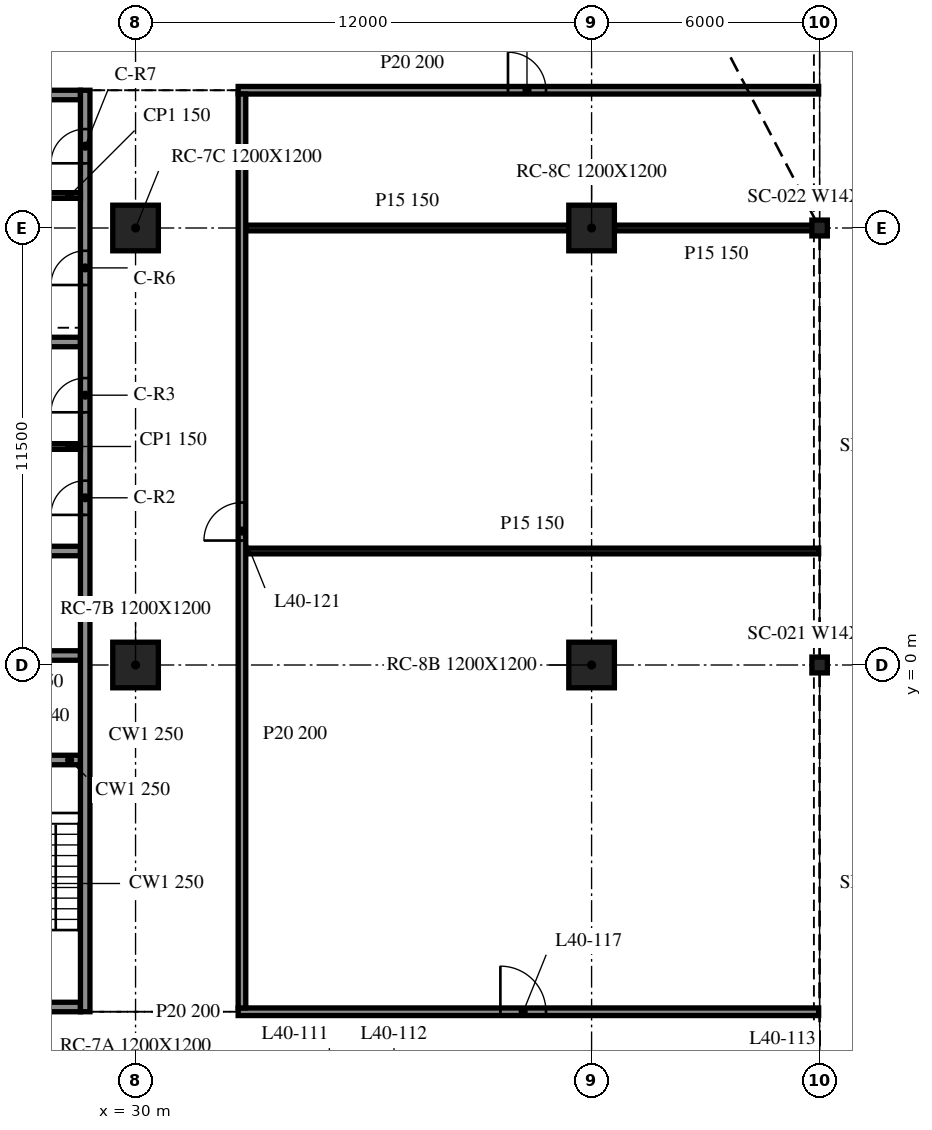
"""IFC4 building model, lengths in metres.
Left out: names, types, materials, properties, quantities, classifications, styles, units other than length and angle.
Written with IfcOpenShell. Run it as: python <this file> out.ifc"""

import sys

from ifc_helpers import new_model, si_unit, direction, frame, frame_2d, origin, origin_2d, place, context, subcontext, project, spatial, rectangle, i_section, extrude, element, fill, save


model = new_model("IFC4")
c1 = context("Model", 3, precision=1e-05, world=origin(), true_north=direction((0.0, 1.0)))
c2 = subcontext(c1, "Body", "Model", "MODEL_VIEW")
j1 = project(units=[si_unit("LENGTHUNIT", "METRE"), si_unit("PLANEANGLEUNIT", "RADIAN")], contexts=[c1])
p1 = place(None, origin())
s1 = spatial("IfcSite", under=j1, at=p1, CompositionType="ELEMENT")
p2 = place(p1, origin())
s2 = spatial("IfcBuilding", under=s1, at=p2, CompositionType="ELEMENT")
p3 = place(p2, frame((0.0, 0.0, 170.6)))
s3 = spatial("IfcBuildingStorey", under=s2, at=p3, CompositionType="ELEMENT", Elevation=170.6)
for number, where, z_axis, x_axis in (
    (1, (30.0, 0.0, -0.34), (0.0, 0.0, 1.0), (1.0, 0.0, 0.0)),
    (2, (30.0, 11.5, -0.34), (0.0, 0.0, 1.0), (1.0, 0.0, 0.0)),
    (3, (42.0, 0.0, -0.34), (0.0, 0.0, 1.0), (1.0, 0.0, 0.0)),
    (4, (42.0, 11.5, -0.34), (0.0, 0.0, 1.0), (1.0, 0.0, 0.0)),
):
    element("IfcColumn", number, at=place(p3, frame(where, z_axis=z_axis, x_axis=x_axis)), inside=s3, PredefinedType="COLUMN", context=c2, shape_type="SweptSolid", body=[
        extrude(rectangle(XDim=1.2, YDim=1.2, at=origin_2d()), origin(), (0.0, 0.0, 1.0), 3.8),
    ])
for number, where, z_axis, x_axis in (
    (5, (48.0, 0.0, -0.34), (0.0, 0.0, 1.0), (1.0, 0.0, 0.0)),
    (6, (48.0, 11.5, -0.34), (0.0, 0.0, 1.0), (1.0, 0.0, 0.0)),
):
    element("IfcColumn", number, at=place(p3, frame(where, z_axis=z_axis, x_axis=x_axis)), inside=s3, PredefinedType="COLUMN", context=c2, shape_type="SweptSolid", body=[
        extrude(i_section(OverallWidth=0.406, OverallDepth=0.417, WebThickness=0.03, FlangeThickness=0.048, at=origin_2d()), origin(), (0.0, 0.0, 1.0), 3.8),
    ])
p4 = place(p3, frame((28.675, -9.125, 0.0), z_axis=(0.0, 0.0, 1.0), x_axis=(0.0, 1.0, 0.0)))
e7 = element("IfcWall", 7, at=p4, inside=s3, PredefinedType="SOLIDWALL", context=c2, shape_type="SweptSolid", body=[
    extrude(rectangle(XDim=24.25, YDim=0.25, at=frame_2d((12.125, 0.0))), origin(), (0.0, 0.0, 1.0), 3.46),
])
p5 = place(p4, frame((13.075, 0.0, 0.0)))
e8 = element("IfcOpeningElement", 8, at=p5, cuts=e7, PredefinedType="OPENING", context=c2, shape_type="SweptSolid", body=[
    extrude(rectangle(XDim=0.9, YDim=2.1, at=frame_2d((0.45, 1.05))), frame((0.0, 0.135, 0.0), z_axis=(0.0, -1.0, 0.0), x_axis=(1.0, 0.0, 0.0)), (0.0, 0.0, 1.0), 0.27),
])
p6 = place(p4, frame((15.775, 0.0, 0.0)))
e9 = element("IfcOpeningElement", 9, at=p6, cuts=e7, PredefinedType="OPENING", context=c2, shape_type="SweptSolid", body=[
    extrude(rectangle(XDim=0.9, YDim=2.1, at=frame_2d((0.45, 1.05))), frame((0.0, 0.135, 0.0), z_axis=(0.0, -1.0, 0.0), x_axis=(1.0, 0.0, 0.0)), (0.0, 0.0, 1.0), 0.27),
])
p7 = place(p4, frame((19.125, 0.0, 0.0)))
e10 = element("IfcOpeningElement", 10, at=p7, cuts=e7, PredefinedType="OPENING", context=c2, shape_type="SweptSolid", body=[
    extrude(rectangle(XDim=0.9, YDim=2.1, at=frame_2d((0.45, 1.05))), frame((0.0, 0.135, 0.0), z_axis=(0.0, -1.0, 0.0), x_axis=(1.0, 0.0, 0.0)), (0.0, 0.0, 1.0), 0.27),
])
p8 = place(p4, frame((22.327, 0.0, 0.0)))
e11 = element("IfcOpeningElement", 11, at=p8, cuts=e7, PredefinedType="OPENING", context=c2, shape_type="SweptSolid", body=[
    extrude(rectangle(XDim=0.9, YDim=2.1, at=frame_2d((0.45, 1.05))), frame((0.0, 0.135, 0.0), z_axis=(0.0, -1.0, 0.0), x_axis=(1.0, 0.0, 0.0)), (0.0, 0.0, 1.0), 0.27),
])
p9 = place(p3, frame((28.55, -9.0, 0.0), z_axis=(0.0, 0.0, 1.0), x_axis=(-1.0, 0.0, 0.0)))
e12 = element("IfcWall", 12, at=p9, inside=s3, PredefinedType="SOLIDWALL", context=c2, shape_type="SweptSolid", body=[
    extrude(rectangle(XDim=9.1, YDim=0.25, at=frame_2d((4.55, 0.0))), origin(), (0.0, 0.0, 1.0), 3.46),
])
p10 = place(p9, frame((3.65, 0.0, 0.0)))
e13 = element("IfcOpeningElement", 13, at=p10, cuts=e12, PredefinedType="OPENING", context=c2, shape_type="SweptSolid", body=[
    extrude(rectangle(XDim=1.8, YDim=2.1, at=frame_2d((0.9, 1.05))), frame((0.0, 0.135, 0.0), z_axis=(0.0, -1.0, 0.0), x_axis=(1.0, 0.0, 0.0)), (0.0, 0.0, 1.0), 0.27),
])
p11 = place(p3, frame((19.45, 15.0, 0.0), z_axis=(0.0, 0.0, 1.0), x_axis=(1.0, 0.0, 0.0)))
e14 = element("IfcWall", 14, at=p11, inside=s3, PredefinedType="SOLIDWALL", context=c2, shape_type="SweptSolid", body=[
    extrude(rectangle(XDim=9.1, YDim=0.25, at=frame_2d((4.55, 0.0))), origin(), (0.0, 0.0, 1.0), 3.46),
])
p12 = place(p11, frame((3.65, 0.0, 0.0)))
e15 = element("IfcOpeningElement", 15, at=p12, cuts=e14, PredefinedType="OPENING", context=c2, shape_type="SweptSolid", body=[
    extrude(rectangle(XDim=1.8, YDim=2.1, at=frame_2d((0.9, 1.05))), frame((0.0, 0.135, 0.0), z_axis=(0.0, -1.0, 0.0), x_axis=(1.0, 0.0, 0.0)), (0.0, 0.0, 1.0), 0.27),
])
for number, where, z_axis, x_axis in (
    (16, (25.7, -2.5, 0.0), (0.0, 0.0, 1.0), (1.0, 0.0, 0.0)),
    (17, (25.7, 0.25, 0.0), (0.0, 0.0, 1.0), (1.0, 0.0, 0.0)),
    (18, (25.7, 3.0, 0.0), (0.0, 0.0, 1.0), (1.0, 0.0, 0.0)),
    (19, (25.7, 8.5, 0.0), (0.0, 0.0, 1.0), (1.0, 0.0, 0.0)),
):
    element("IfcWall", number, at=place(p3, frame(where, z_axis=z_axis, x_axis=x_axis)), inside=s3, PredefinedType="SOLIDWALL", context=c2, shape_type="SweptSolid", body=[
        extrude(rectangle(XDim=2.85, YDim=0.25, at=frame_2d((1.425, 0.0))), origin(), (0.0, 0.0, 1.0), 3.46),
    ])
for number, where, z_axis, x_axis in (
    (20, (25.7, 5.75, 0.0), (0.0, 0.0, 1.0), (1.0, 0.0, 0.0)),
    (21, (25.7, 12.355, 0.0), (0.0, 0.0, 1.0), (1.0, 0.0, 0.0)),
):
    element("IfcWall", number, at=place(p3, frame(where, z_axis=z_axis, x_axis=x_axis)), inside=s3, PredefinedType="PARTITIONING", context=c2, shape_type="SweptSolid", body=[
        extrude(rectangle(XDim=2.85, YDim=0.15, at=frame_2d((1.425, 0.0))), origin(), (0.0, 0.0, 1.0), 3.46),
    ])
p13 = place(p3, frame((32.7, -9.125, 0.0), z_axis=(0.0, 0.0, 1.0), x_axis=(1.0, 0.0, 0.0)))
e22 = element("IfcWall", 22, at=p13, inside=s3, PredefinedType="PARTITIONING", context=c2, shape_type="SweptSolid", body=[
    extrude(rectangle(XDim=15.275, YDim=0.2, at=frame_2d((7.638, 0.0))), origin(), (0.0, 0.0, 1.0), 3.46),
])
p14 = place(p13, frame((6.9, 0.0, 0.0)))
e23 = element("IfcOpeningElement", 23, at=p14, cuts=e22, PredefinedType="OPENING", context=c2, shape_type="SweptSolid", body=[
    extrude(rectangle(XDim=1.2, YDim=2.1, at=frame_2d((0.6, 1.05))), frame((0.0, 0.11, 0.0), z_axis=(0.0, -1.0, 0.0), x_axis=(1.0, 0.0, 0.0)), (0.0, 0.0, 1.0), 0.22),
])
p15 = place(p3, frame((32.9, 3.0, 0.0), z_axis=(0.0, 0.0, 1.0), x_axis=(1.0, 0.0, 0.0)))
e24 = element("IfcWall", 24, at=p15, inside=s3, PredefinedType="PARTITIONING", context=c2, shape_type="SweptSolid", body=[
    extrude(rectangle(XDim=15.075, YDim=0.15, at=frame_2d((7.538, 0.0))), origin(), (0.0, 0.0, 1.0), 3.46),
])
p16 = place(p3, frame((32.9, 11.5, 0.0), z_axis=(0.0, 0.0, 1.0), x_axis=(1.0, 0.0, 0.0)))
e25 = element("IfcWall", 25, at=p16, inside=s3, PredefinedType="PARTITIONING", context=c2, shape_type="SweptSolid", body=[
    extrude(rectangle(XDim=8.5, YDim=0.15, at=frame_2d((4.25, 0.0))), origin(), (0.0, 0.0, 1.0), 3.46),
])
p17 = place(p3, frame((42.6, 11.5, 0.0), z_axis=(0.0, 0.0, 1.0), x_axis=(1.0, 0.0, 0.0)))
e26 = element("IfcWall", 26, at=p17, inside=s3, PredefinedType="PARTITIONING", context=c2, shape_type="SweptSolid", body=[
    extrude(rectangle(XDim=5.375, YDim=0.15, at=frame_2d((2.688, 0.0))), origin(), (0.0, 0.0, 1.0), 3.46),
])
p18 = place(p3, frame((32.7, 15.125, 0.0), z_axis=(0.0, 0.0, 1.0), x_axis=(1.0, 0.0, 0.0)))
e27 = element("IfcWall", 27, at=p18, inside=s3, PredefinedType="PARTITIONING", context=c2, shape_type="SweptSolid", body=[
    extrude(rectangle(XDim=15.275, YDim=0.2, at=frame_2d((7.638, 0.0))), origin(), (0.0, 0.0, 1.0), 3.46),
])
p19 = place(p18, frame((7.1, 0.0, 0.0)))
e28 = element("IfcOpeningElement", 28, at=p19, cuts=e27, PredefinedType="OPENING", context=c2, shape_type="SweptSolid", body=[
    extrude(rectangle(XDim=1.0, YDim=2.1, at=frame_2d((0.5, 1.05))), frame((0.0, 0.11, 0.0), z_axis=(0.0, -1.0, 0.0), x_axis=(1.0, 0.0, 0.0)), (0.0, 0.0, 1.0), 0.22),
])
p20 = place(p3, frame((32.8, -9.025, 0.0), z_axis=(0.0, 0.0, 1.0), x_axis=(0.0, 1.0, 0.0)))
e29 = element("IfcWall", 29, at=p20, inside=s3, PredefinedType="PARTITIONING", context=c2, shape_type="SweptSolid", body=[
    extrude(rectangle(XDim=24.05, YDim=0.2, at=frame_2d((12.025, 0.0))), origin(), (0.0, 0.0, 1.0), 3.46),
])
p21 = place(p20, frame((12.3, 0.0, 0.0)))
e30 = element("IfcOpeningElement", 30, at=p21, cuts=e29, PredefinedType="OPENING", context=c2, shape_type="SweptSolid", body=[
    extrude(rectangle(XDim=1.0, YDim=2.1, at=frame_2d((0.5, 1.05))), frame((0.0, 0.11, 0.0), z_axis=(0.0, -1.0, 0.0), x_axis=(1.0, 0.0, 0.0)), (0.0, 0.0, 1.0), 0.22),
])
p22 = place(p5, origin())
e31 = element("IfcDoor", 31, at=p22, inside=s3, OperationType="SINGLE_SWING_RIGHT", PredefinedType="DOOR", context=c2, shape_type="SweptSolid", body=[
    extrude(rectangle(XDim=0.9, YDim=2.1, at=frame_2d((0.45, 1.05))), frame((0.0, 0.025, 0.0), z_axis=(0.0, -1.0, 0.0), x_axis=(1.0, 0.0, 0.0)), (0.0, 0.0, 1.0), 0.05),
])
fill(e8, e31)
p23 = place(p6, origin())
e32 = element("IfcDoor", 32, at=p23, inside=s3, OperationType="SINGLE_SWING_LEFT", PredefinedType="DOOR", context=c2, shape_type="SweptSolid", body=[
    extrude(rectangle(XDim=0.9, YDim=2.1, at=frame_2d((0.45, 1.05))), frame((0.0, 0.025, 0.0), z_axis=(0.0, -1.0, 0.0), x_axis=(1.0, 0.0, 0.0)), (0.0, 0.0, 1.0), 0.05),
])
fill(e9, e32)
p24 = place(p7, origin())
e33 = element("IfcDoor", 33, at=p24, inside=s3, OperationType="SINGLE_SWING_RIGHT", PredefinedType="DOOR", context=c2, shape_type="SweptSolid", body=[
    extrude(rectangle(XDim=0.9, YDim=2.1, at=frame_2d((0.45, 1.05))), frame((0.0, 0.025, 0.0), z_axis=(0.0, -1.0, 0.0), x_axis=(1.0, 0.0, 0.0)), (0.0, 0.0, 1.0), 0.05),
])
fill(e10, e33)
p25 = place(p8, origin())
e34 = element("IfcDoor", 34, at=p25, inside=s3, OperationType="SINGLE_SWING_LEFT", PredefinedType="DOOR", context=c2, shape_type="SweptSolid", body=[
    extrude(rectangle(XDim=0.9, YDim=2.1, at=frame_2d((0.45, 1.05))), frame((0.0, 0.025, 0.0), z_axis=(0.0, -1.0, 0.0), x_axis=(1.0, 0.0, 0.0)), (0.0, 0.0, 1.0), 0.05),
])
fill(e11, e34)
p26 = place(p14, origin())
e35 = element("IfcDoor", 35, at=p26, inside=s3, OperationType="SINGLE_SWING_LEFT", PredefinedType="DOOR", context=c2, shape_type="SweptSolid", body=[
    extrude(rectangle(XDim=1.2, YDim=2.1, at=frame_2d((0.6, 1.05))), frame((0.0, 0.025, 0.0), z_axis=(0.0, -1.0, 0.0), x_axis=(1.0, 0.0, 0.0)), (0.0, 0.0, 1.0), 0.05),
])
fill(e23, e35)
p27 = place(p21, origin())
e36 = element("IfcDoor", 36, at=p27, inside=s3, OperationType="SINGLE_SWING_LEFT", PredefinedType="DOOR", context=c2, shape_type="SweptSolid", body=[
    extrude(rectangle(XDim=1.0, YDim=2.1, at=frame_2d((0.5, 1.05))), frame((0.0, 0.025, 0.0), z_axis=(0.0, -1.0, 0.0), x_axis=(1.0, 0.0, 0.0)), (0.0, 0.0, 1.0), 0.05),
])
fill(e30, e36)
p28 = place(p19, origin())
e37 = element("IfcDoor", 37, at=p28, inside=s3, OperationType="SINGLE_SWING_LEFT", PredefinedType="DOOR", context=c2, shape_type="SweptSolid", body=[
    extrude(rectangle(XDim=1.0, YDim=2.1, at=frame_2d((0.5, 1.05))), frame((0.0, 0.025, 0.0), z_axis=(0.0, -1.0, 0.0), x_axis=(1.0, 0.0, 0.0)), (0.0, 0.0, 1.0), 0.05),
])
fill(e28, e37)
save(model, sys.argv[1])
